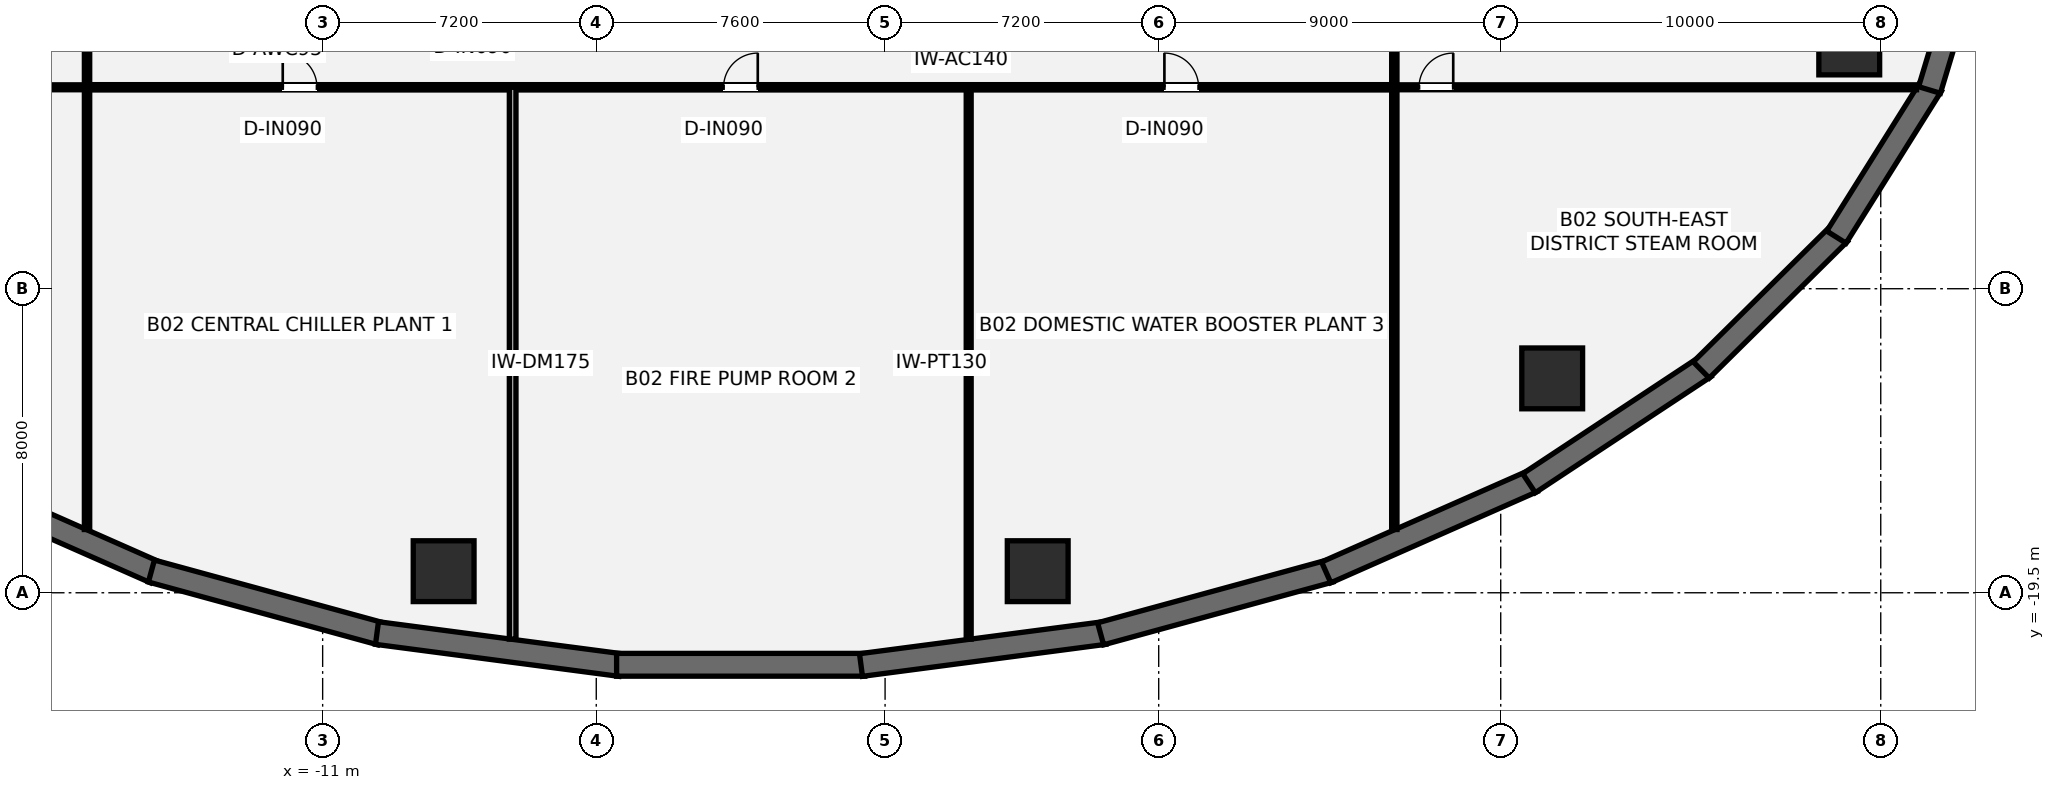
"""IFC4 building model, lengths in metres.
Left out: names, types, materials, properties, quantities, classifications, styles, units other than length and angle.
Written with IfcOpenShell. Run it as: python <this file> out.ifc"""

import sys

from ifc_helpers import new_model, si_unit, direction, frame, frame_2d, origin, origin_2d, place, context, subcontext, project, spatial, rectangle, hollow_circle, extrude, element, fill, save


model = new_model("IFC4")
c1 = context("Model", 3, precision=1e-05, world=origin(), true_north=direction((0.0, 1.0)))
c2 = subcontext(c1, "Body", "Model", "MODEL_VIEW")
j1 = project(units=[si_unit("LENGTHUNIT", "METRE"), si_unit("PLANEANGLEUNIT", "RADIAN")], contexts=[c1])
p1 = place(None, origin())
s1 = spatial("IfcSite", under=j1, at=p1, CompositionType="ELEMENT")
p2 = place(p1, origin())
s2 = spatial("IfcBuilding", under=s1, at=p2, CompositionType="ELEMENT")
p3 = place(p2, frame((0.0, 0.0, -8.8)))
s3 = spatial("IfcBuildingStorey", under=s2, at=p3, CompositionType="ELEMENT", Elevation=-8.8)
p4 = place(p3, frame((-20.841, -16.565, 0.0), z_axis=(0.0, 0.0, 1.0), x_axis=(0.91483072277, -0.403837527574, 0.0)))
e1 = element("IfcWall", 1, at=p4, inside=s3, PredefinedType="USERDEFINED", context=c2, shape_type="SweptSolid", body=[
    extrude(rectangle(XDim=5.94, YDim=0.6, at=frame_2d((2.97, 0.0))), origin(), (0.0, 0.0, 1.0), 4.4),
])
p5 = place(p3, frame((-15.506, -18.929, 0.0), z_axis=(0.0, 0.0, 1.0), x_axis=(0.964548276597, -0.263906464707, 0.0)))
e2 = element("IfcWall", 2, at=p5, inside=s3, PredefinedType="USERDEFINED", context=c2, shape_type="SweptSolid", body=[
    extrude(rectangle(XDim=6.257, YDim=0.6, at=frame_2d((3.128, 0.0))), origin(), (0.0, 0.0, 1.0), 4.4),
])
p6 = place(p3, frame((-9.57, -20.56, 0.0), z_axis=(0.0, 0.0, 1.0), x_axis=(0.991471782517, -0.130321542624, 0.0)))
e3 = element("IfcWall", 3, at=p6, inside=s3, PredefinedType="USERDEFINED", context=c2, shape_type="SweptSolid", body=[
    extrude(rectangle(XDim=6.459, YDim=0.6, at=frame_2d((3.23, 0.0))), origin(), (0.0, 0.0, 1.0), 4.4),
])
p7 = place(p3, frame((-3.265, -21.395, 0.0), z_axis=(0.0, 0.0, 1.0), x_axis=(1.0, 0.0, 0.0)))
e4 = element("IfcWall", 4, at=p7, inside=s3, PredefinedType="USERDEFINED", context=c2, shape_type="SweptSolid", body=[
    extrude(rectangle(XDim=6.529, YDim=0.6, at=frame_2d((3.265, 0.0))), origin(), (0.0, 0.0, 1.0), 4.4),
])
p8 = place(p3, frame((3.166, -21.402, 0.0), z_axis=(0.0, 0.0, 1.0), x_axis=(0.991471782517, 0.130321542624, 0.0)))
e5 = element("IfcWall", 5, at=p8, inside=s3, PredefinedType="USERDEFINED", context=c2, shape_type="SweptSolid", body=[
    extrude(rectangle(XDim=6.459, YDim=0.6, at=frame_2d((3.23, 0.0))), origin(), (0.0, 0.0, 1.0), 4.4),
])
p9 = place(p3, frame((9.471, -20.58, 0.0), z_axis=(0.0, 0.0, 1.0), x_axis=(0.964548276597, 0.263906464707, 0.0)))
e6 = element("IfcWall", 6, at=p9, inside=s3, PredefinedType="USERDEFINED", context=c2, shape_type="SweptSolid", body=[
    extrude(rectangle(XDim=6.257, YDim=0.6, at=frame_2d((3.128, 0.0))), origin(), (0.0, 0.0, 1.0), 4.4),
])
p10 = place(p3, frame((15.407, -18.964, 0.0), z_axis=(0.0, 0.0, 1.0), x_axis=(0.91483072277, 0.403837527574, 0.0)))
e7 = element("IfcWall", 7, at=p10, inside=s3, PredefinedType="USERDEFINED", context=c2, shape_type="SweptSolid", body=[
    extrude(rectangle(XDim=5.94, YDim=0.6, at=frame_2d((2.97, 0.0))), origin(), (0.0, 0.0, 1.0), 4.4),
])
p11 = place(p3, frame((20.745, -16.618, 0.0), z_axis=(0.0, 0.0, 1.0), x_axis=(0.834367518908, 0.551208529861, 0.0)))
e8 = element("IfcWall", 8, at=p11, inside=s3, PredefinedType="USERDEFINED", context=c2, shape_type="SweptSolid", body=[
    extrude(rectangle(XDim=5.542, YDim=0.6, at=frame_2d((2.771, 0.0))), origin(), (0.0, 0.0, 1.0), 4.4),
])
p12 = place(p3, frame((25.277, -13.638, 0.0), z_axis=(0.0, 0.0, 1.0), x_axis=(0.711105403666, 0.70308541791, 0.0)))
e9 = element("IfcWall", 9, at=p12, inside=s3, PredefinedType="USERDEFINED", context=c2, shape_type="SweptSolid", body=[
    extrude(rectangle(XDim=5.114, YDim=0.6, at=frame_2d((2.557, 0.0))), origin(), (0.0, 0.0, 1.0), 4.4),
])
p13 = place(p3, frame((28.833, -10.142, 0.0), z_axis=(0.0, 0.0, 1.0), x_axis=(0.531244363113, 0.847218641592, 0.0)))
e10 = element("IfcWall", 10, at=p13, inside=s3, PredefinedType="USERDEFINED", context=c2, shape_type="SweptSolid", body=[
    extrude(rectangle(XDim=4.72, YDim=0.6, at=frame_2d((2.36, 0.0))), origin(), (0.0, 0.0, 1.0), 4.4),
])
p14 = place(p3, frame((31.283, -6.271, 0.0), z_axis=(0.0, 0.0, 1.0), x_axis=(0.288296686647, 0.95754113252, 0.0)))
e11 = element("IfcWall", 11, at=p14, inside=s3, PredefinedType="USERDEFINED", context=c2, shape_type="SweptSolid", body=[
    extrude(rectangle(XDim=4.438, YDim=0.6, at=frame_2d((2.219, 0.0))), origin(), (0.0, 0.0, 1.0), 4.4),
])
for number, where, z_axis, x_axis in (
    (12, (-7.816, -18.932, 0.0), (0.0, 0.0, 1.0), (1.0, 0.0, 0.0)),
    (13, (7.816, -18.932, 0.0), (0.0, 0.0, 1.0), (1.0, 0.0, 0.0)),
    (14, (21.354, -13.859, 0.0), (0.0, 0.0, 1.0), (1.0, 0.0, 0.0)),
    (15, (29.171, -5.073, 0.0), (0.0, 0.0, 1.0), (1.0, 0.0, 0.0)),
):
    element("IfcColumn", number, at=place(p3, frame(where, z_axis=z_axis, x_axis=x_axis)), inside=s3, PredefinedType="USERDEFINED", context=c2, shape_type="SweptSolid", body=[
        extrude(hollow_circle(Radius=0.8, WallThickness=0.06, at=origin_2d()), origin(), (0.0, 0.0, 1.0), 4.4),
    ])
p15 = place(p3, frame((-17.2, -6.2, 0.0), z_axis=(0.0, 0.0, 1.0), x_axis=(1.0, 0.0, 0.0)))
e16 = element("IfcWall", 16, at=p15, inside=s3, PredefinedType="PARTITIONING", context=c2, shape_type="SweptSolid", body=[
    extrude(rectangle(XDim=34.4, YDim=0.14, at=frame_2d((17.2, 0.0))), origin(), (0.0, 0.0, 1.0), 4.14),
])
p16 = place(p15, frame((5.15, 0.0, 0.0)))
e17 = element("IfcOpeningElement", 17, at=p16, cuts=e16, PredefinedType="OPENING", context=c2, shape_type="SweptSolid", body=[
    extrude(rectangle(XDim=0.9, YDim=2.1, at=frame_2d((0.45, 1.05))), frame((0.0, 0.08, 0.0), z_axis=(0.0, -1.0, 0.0), x_axis=(1.0, 0.0, 0.0)), (0.0, 0.0, 1.0), 0.16),
])
p17 = place(p15, frame((16.75, 0.0, 0.0)))
e18 = element("IfcOpeningElement", 18, at=p17, cuts=e16, PredefinedType="OPENING", context=c2, shape_type="SweptSolid", body=[
    extrude(rectangle(XDim=0.9, YDim=2.1, at=frame_2d((0.45, 1.05))), frame((0.0, 0.08, 0.0), z_axis=(0.0, -1.0, 0.0), x_axis=(1.0, 0.0, 0.0)), (0.0, 0.0, 1.0), 0.16),
])
p18 = place(p15, frame((28.35, 0.0, 0.0)))
e19 = element("IfcOpeningElement", 19, at=p18, cuts=e16, PredefinedType="OPENING", context=c2, shape_type="SweptSolid", body=[
    extrude(rectangle(XDim=0.9, YDim=2.1, at=frame_2d((0.45, 1.05))), frame((0.0, 0.08, 0.0), z_axis=(0.0, -1.0, 0.0), x_axis=(1.0, 0.0, 0.0)), (0.0, 0.0, 1.0), 0.16),
])
p19 = place(p3, frame((-17.2, -17.836, 0.0), z_axis=(0.0, 0.0, 1.0), x_axis=(0.0, 1.0, 0.0)))
e20 = element("IfcWall", 20, at=p19, inside=s3, PredefinedType="PARTITIONING", context=c2, shape_type="SweptSolid", body=[
    extrude(rectangle(XDim=25.386, YDim=0.14, at=frame_2d((12.693, 0.0))), origin(), (0.0, 0.0, 1.0), 3.508),
])
p20 = place(p19, frame((15.036, 0.0, 0.0)))
e21 = element("IfcOpeningElement", 21, at=p20, cuts=e20, PredefinedType="OPENING", context=c2, shape_type="SweptSolid", body=[
    extrude(rectangle(XDim=0.9, YDim=2.1, at=frame_2d((0.45, 1.05))), frame((0.0, 0.08, 0.0), z_axis=(0.0, -1.0, 0.0), x_axis=(1.0, 0.0, 0.0)), (0.0, 0.0, 1.0), 0.16),
])
p21 = place(p19, frame((21.911, 0.0, 0.0)))
e22 = element("IfcOpeningElement", 22, at=p21, cuts=e20, PredefinedType="OPENING", context=c2, shape_type="SweptSolid", body=[
    extrude(rectangle(XDim=0.9, YDim=2.1, at=frame_2d((0.45, 1.05))), frame((0.0, 0.08, 0.0), z_axis=(0.0, -1.0, 0.0), x_axis=(1.0, 0.0, 0.0)), (0.0, 0.0, 1.0), 0.16),
])
p22 = place(p3, frame((17.2, -17.836, 0.0), z_axis=(0.0, 0.0, 1.0), x_axis=(0.0, 1.0, 0.0)))
e23 = element("IfcWall", 23, at=p22, inside=s3, PredefinedType="PARTITIONING", context=c2, shape_type="SweptSolid", body=[
    extrude(rectangle(XDim=25.386, YDim=0.14, at=frame_2d((12.693, 0.0))), origin(), (0.0, 0.0, 1.0), 3.508),
])
p23 = place(p22, frame((15.036, 0.0, 0.0)))
e24 = element("IfcOpeningElement", 24, at=p23, cuts=e23, PredefinedType="OPENING", context=c2, shape_type="SweptSolid", body=[
    extrude(rectangle(XDim=0.9, YDim=2.1, at=frame_2d((0.45, 1.05))), frame((0.0, 0.08, 0.0), z_axis=(0.0, -1.0, 0.0), x_axis=(1.0, 0.0, 0.0)), (0.0, 0.0, 1.0), 0.16),
])
p24 = place(p22, frame((21.911, 0.0, 0.0)))
e25 = element("IfcOpeningElement", 25, at=p24, cuts=e23, PredefinedType="OPENING", context=c2, shape_type="SweptSolid", body=[
    extrude(rectangle(XDim=0.9, YDim=2.1, at=frame_2d((0.45, 1.05))), frame((0.0, 0.08, 0.0), z_axis=(0.0, -1.0, 0.0), x_axis=(1.0, 0.0, 0.0)), (0.0, 0.0, 1.0), 0.16),
])
p25 = place(p3, frame((-6.0, -20.719, 0.0), z_axis=(0.0, 0.0, 1.0), x_axis=(0.0, 1.0, 0.0)))
e26 = element("IfcWall", 26, at=p25, inside=s3, PredefinedType="PARTITIONING", context=c2, shape_type="SweptSolid", body=[
    extrude(rectangle(XDim=14.519, YDim=0.175, at=frame_2d((7.259, 0.0))), origin(), (0.0, 0.0, 1.0), 3.508),
])
p26 = place(p3, frame((6.0, -20.719, 0.0), z_axis=(0.0, 0.0, 1.0), x_axis=(0.0, 1.0, 0.0)))
e27 = element("IfcWall", 27, at=p26, inside=s3, PredefinedType="PARTITIONING", context=c2, shape_type="SweptSolid", body=[
    extrude(rectangle(XDim=14.519, YDim=0.13, at=frame_2d((7.259, 0.0))), origin(), (0.0, 0.0, 1.0), 3.508),
])
p27 = place(p3, frame((-30.942, -6.2, 0.0), z_axis=(0.0, 0.0, 1.0), x_axis=(1.0, 0.0, 0.0)))
e28 = element("IfcWall", 28, at=p27, inside=s3, PredefinedType="PARTITIONING", context=c2, shape_type="SweptSolid", body=[
    extrude(rectangle(XDim=13.742, YDim=0.13, at=frame_2d((6.871, 0.0))), origin(), (0.0, 0.0, 1.0), 3.118),
])
p28 = place(p27, frame((2.67, 0.0, 0.0)))
e29 = element("IfcOpeningElement", 29, at=p28, cuts=e28, PredefinedType="OPENING", context=c2, shape_type="SweptSolid", body=[
    extrude(rectangle(XDim=0.9, YDim=2.1, at=frame_2d((0.45, 1.05))), frame((0.0, 0.075, 0.0), z_axis=(0.0, -1.0, 0.0), x_axis=(1.0, 0.0, 0.0)), (0.0, 0.0, 1.0), 0.15),
])
p29 = place(p3, frame((17.2, -6.2, 0.0), z_axis=(0.0, 0.0, 1.0), x_axis=(1.0, 0.0, 0.0)))
e30 = element("IfcWall", 30, at=p29, inside=s3, PredefinedType="PARTITIONING", context=c2, shape_type="SweptSolid", body=[
    extrude(rectangle(XDim=13.742, YDim=0.13, at=frame_2d((6.871, 0.0))), origin(), (0.0, 0.0, 1.0), 3.118),
])
p30 = place(p29, frame((0.65, 0.0, 0.0)))
e31 = element("IfcOpeningElement", 31, at=p30, cuts=e30, PredefinedType="OPENING", context=c2, shape_type="SweptSolid", body=[
    extrude(rectangle(XDim=0.9, YDim=2.1, at=frame_2d((0.45, 1.05))), frame((0.0, 0.075, 0.0), z_axis=(0.0, -1.0, 0.0), x_axis=(1.0, 0.0, 0.0)), (0.0, 0.0, 1.0), 0.15),
])
p31 = place(p16, origin())
e32 = element("IfcDoor", 32, at=p31, inside=s3, OperationType="SINGLE_SWING_LEFT", PredefinedType="DOOR", context=c2, shape_type="SweptSolid", body=[
    extrude(rectangle(XDim=0.9, YDim=2.1, at=frame_2d((0.45, 1.05))), frame((0.0, 0.025, 0.0), z_axis=(0.0, -1.0, 0.0), x_axis=(1.0, 0.0, 0.0)), (0.0, 0.0, 1.0), 0.05),
])
fill(e17, e32)
p32 = place(p17, origin())
e33 = element("IfcDoor", 33, at=p32, inside=s3, OperationType="SINGLE_SWING_RIGHT", PredefinedType="DOOR", context=c2, shape_type="SweptSolid", body=[
    extrude(rectangle(XDim=0.9, YDim=2.1, at=frame_2d((0.45, 1.05))), frame((0.0, 0.025, 0.0), z_axis=(0.0, -1.0, 0.0), x_axis=(1.0, 0.0, 0.0)), (0.0, 0.0, 1.0), 0.05),
])
fill(e18, e33)
p33 = place(p18, origin())
e34 = element("IfcDoor", 34, at=p33, inside=s3, OperationType="SINGLE_SWING_LEFT", PredefinedType="DOOR", context=c2, shape_type="SweptSolid", body=[
    extrude(rectangle(XDim=0.9, YDim=2.1, at=frame_2d((0.45, 1.05))), frame((0.0, 0.025, 0.0), z_axis=(0.0, -1.0, 0.0), x_axis=(1.0, 0.0, 0.0)), (0.0, 0.0, 1.0), 0.05),
])
fill(e19, e34)
p34 = place(p30, origin())
e35 = element("IfcDoor", 35, at=p34, inside=s3, OperationType="SINGLE_SWING_RIGHT", PredefinedType="DOOR", context=c2, shape_type="SweptSolid", body=[
    extrude(rectangle(XDim=0.9, YDim=2.1, at=frame_2d((0.45, 1.05))), frame((0.0, 0.025, 0.0), z_axis=(0.0, -1.0, 0.0), x_axis=(1.0, 0.0, 0.0)), (0.0, 0.0, 1.0), 0.05),
])
fill(e31, e35)
save(model, sys.argv[1])
